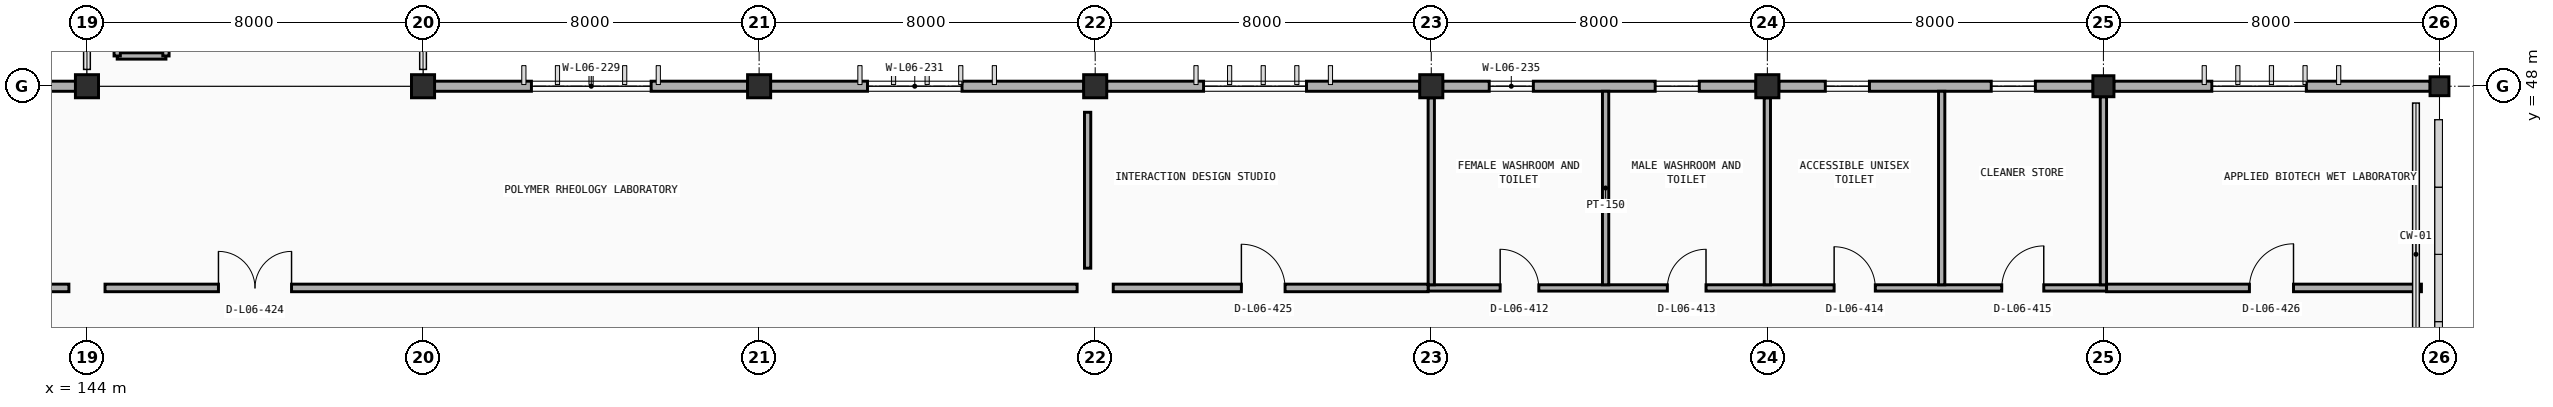
"""IFC4 building model, lengths in metres.
Left out: names, types, materials, properties, quantities, classifications, styles, units other than length and angle.
Written with IfcOpenShell. Run it as: python <this file> out.ifc"""

import sys

from ifc_helpers import new_model, si_unit, direction, frame, frame_2d, origin, origin_2d, place, context, subcontext, project, spatial, rectangle, extrude, element, fill, save


model = new_model("IFC4")
c1 = context("Model", 3, precision=1e-05, world=origin(), true_north=direction((0.0, 1.0)))
c2 = subcontext(c1, "Body", "Model", "MODEL_VIEW")
j1 = project(units=[si_unit("LENGTHUNIT", "METRE"), si_unit("PLANEANGLEUNIT", "RADIAN")], contexts=[c1])
p1 = place(None, origin())
s1 = spatial("IfcSite", under=j1, at=p1, CompositionType="ELEMENT")
p2 = place(p1, origin())
s2 = spatial("IfcBuilding", under=s1, at=p2, CompositionType="ELEMENT")
p3 = place(p2, frame((0.0, 0.0, 22.2)))
s3 = spatial("IfcBuildingStorey", under=s2, at=p3, CompositionType="ELEMENT", Elevation=22.2)
for number, where, z_axis, x_axis in (
    (1, (144.0, 48.0, 0.0), (0.0, 0.0, 1.0), (1.0, 0.0, 0.0)),
    (2, (152.0, 48.0, 0.0), (0.0, 0.0, 1.0), (1.0, 0.0, 0.0)),
    (3, (160.0, 48.0, 0.0), (0.0, 0.0, 1.0), (1.0, 0.0, 0.0)),
    (4, (168.0, 48.0, 0.0), (0.0, 0.0, 1.0), (1.0, 0.0, 0.0)),
    (5, (176.0, 48.0, 0.0), (0.0, 0.0, 1.0), (1.0, 0.0, 0.0)),
    (6, (184.0, 48.0, 0.0), (0.0, 0.0, 1.0), (1.0, 0.0, 0.0)),
):
    element("IfcColumn", number, at=place(p3, frame(where, z_axis=z_axis, x_axis=x_axis)), inside=s3, PredefinedType="COLUMN", context=c2, shape_type="SweptSolid", body=[
        extrude(rectangle(XDim=0.55, YDim=0.55, at=origin_2d()), origin(), (0.0, 0.0, 1.0), 4.2),
    ])
p4 = place(p3, frame((192.0, 48.0, 0.0), z_axis=(0.0, 0.0, 1.0), x_axis=(1.0, 0.0, 0.0)))
e7 = element("IfcColumn", 7, at=p4, inside=s3, PredefinedType="COLUMN", context=c2, shape_type="SweptSolid", body=[
    extrude(rectangle(XDim=0.5, YDim=0.5, at=origin_2d()), origin(), (0.0, 0.0, 1.0), 4.2),
])
p5 = place(p3, frame((200.0, 48.0, 0.0), z_axis=(0.0, 0.0, 1.0), x_axis=(1.0, 0.0, 0.0)))
e8 = element("IfcColumn", 8, at=p5, inside=s3, PredefinedType="COLUMN", context=c2, shape_type="SweptSolid", body=[
    extrude(rectangle(XDim=0.45, YDim=0.45, at=origin_2d()), origin(), (0.0, 0.0, 1.0), 4.2),
])
p6 = place(p3, frame((136.272, 48.0, 0.0), z_axis=(0.0, 0.0, 1.0), x_axis=(1.0, 0.0, 0.0)))
e9 = element("IfcWall", 9, at=p6, inside=s3, PredefinedType="STANDARD", context=c2, shape_type="SweptSolid", body=[
    extrude(rectangle(XDim=7.456, YDim=0.24, at=frame_2d((3.728, 0.0))), origin(), (0.0, 0.0, 1.0), 3.335),
])
p7 = place(p6, frame((2.308, 0.0, 0.9)))
e10 = element("IfcOpeningElement", 10, at=p7, cuts=e9, PredefinedType="OPENING", context=c2, shape_type="SweptSolid", body=[
    extrude(rectangle(XDim=2.45, YDim=1.85, at=frame_2d((1.225, 0.925))), frame((0.0, 0.13, 0.0), z_axis=(0.0, -1.0, 0.0), x_axis=(1.0, 0.0, 0.0)), (0.0, 0.0, 1.0), 0.26),
])
p8 = place(p3, frame((152.272, 48.0, 0.0), z_axis=(0.0, 0.0, 1.0), x_axis=(1.0, 0.0, 0.0)))
e11 = element("IfcWall", 11, at=p8, inside=s3, PredefinedType="STANDARD", context=c2, shape_type="SweptSolid", body=[
    extrude(rectangle(XDim=7.456, YDim=0.24, at=frame_2d((3.728, 0.0))), origin(), (0.0, 0.0, 1.0), 3.335),
])
p9 = place(p8, frame((2.308, 0.0, 0.9)))
e12 = element("IfcOpeningElement", 12, at=p9, cuts=e11, PredefinedType="OPENING", context=c2, shape_type="SweptSolid", body=[
    extrude(rectangle(XDim=2.85, YDim=1.85, at=frame_2d((1.425, 0.925))), frame((0.0, 0.13, 0.0), z_axis=(0.0, -1.0, 0.0), x_axis=(1.0, 0.0, 0.0)), (0.0, 0.0, 1.0), 0.26),
])
p10 = place(p3, frame((160.272, 48.0, 0.0), z_axis=(0.0, 0.0, 1.0), x_axis=(1.0, 0.0, 0.0)))
e13 = element("IfcWall", 13, at=p10, inside=s3, PredefinedType="STANDARD", context=c2, shape_type="SweptSolid", body=[
    extrude(rectangle(XDim=7.456, YDim=0.24, at=frame_2d((3.728, 0.0))), origin(), (0.0, 0.0, 1.0), 3.335),
])
p11 = place(p10, frame((2.308, 0.0, 0.9)))
e14 = element("IfcOpeningElement", 14, at=p11, cuts=e13, PredefinedType="OPENING", context=c2, shape_type="SweptSolid", body=[
    extrude(rectangle(XDim=2.25, YDim=1.85, at=frame_2d((1.125, 0.925))), frame((0.0, 0.13, 0.0), z_axis=(0.0, -1.0, 0.0), x_axis=(1.0, 0.0, 0.0)), (0.0, 0.0, 1.0), 0.26),
])
p12 = place(p3, frame((168.272, 48.0, 0.0), z_axis=(0.0, 0.0, 1.0), x_axis=(1.0, 0.0, 0.0)))
e15 = element("IfcWall", 15, at=p12, inside=s3, PredefinedType="STANDARD", context=c2, shape_type="SweptSolid", body=[
    extrude(rectangle(XDim=7.456, YDim=0.24, at=frame_2d((3.728, 0.0))), origin(), (0.0, 0.0, 1.0), 3.335),
])
p13 = place(p12, frame((2.308, 0.0, 0.9)))
e16 = element("IfcOpeningElement", 16, at=p13, cuts=e15, PredefinedType="OPENING", context=c2, shape_type="SweptSolid", body=[
    extrude(rectangle(XDim=2.45, YDim=1.85, at=frame_2d((1.225, 0.925))), frame((0.0, 0.13, 0.0), z_axis=(0.0, -1.0, 0.0), x_axis=(1.0, 0.0, 0.0)), (0.0, 0.0, 1.0), 0.26),
])
p14 = place(p3, frame((176.272, 48.0, 0.0), z_axis=(0.0, 0.0, 1.0), x_axis=(1.0, 0.0, 0.0)))
e17 = element("IfcWall", 17, at=p14, inside=s3, PredefinedType="STANDARD", context=c2, shape_type="SweptSolid", body=[
    extrude(rectangle(XDim=7.456, YDim=0.24, at=frame_2d((3.728, 0.0))), origin(), (0.0, 0.0, 1.0), 3.335),
])
p15 = place(p14, frame((1.108, 0.0, 1.15)))
e18 = element("IfcOpeningElement", 18, at=p15, cuts=e17, PredefinedType="OPENING", context=c2, shape_type="SweptSolid", body=[
    extrude(rectangle(XDim=1.05, YDim=1.25, at=frame_2d((0.525, 0.625))), frame((0.0, 0.13, 0.0), z_axis=(0.0, -1.0, 0.0), x_axis=(1.0, 0.0, 0.0)), (0.0, 0.0, 1.0), 0.26),
])
p16 = place(p14, frame((5.058, 0.0, 1.15)))
e19 = element("IfcOpeningElement", 19, at=p16, cuts=e17, PredefinedType="OPENING", context=c2, shape_type="SweptSolid", body=[
    extrude(rectangle(XDim=1.05, YDim=1.25, at=frame_2d((0.525, 0.625))), frame((0.0, 0.13, 0.0), z_axis=(0.0, -1.0, 0.0), x_axis=(1.0, 0.0, 0.0)), (0.0, 0.0, 1.0), 0.26),
])
p17 = place(p3, frame((184.272, 48.0, 0.0), z_axis=(0.0, 0.0, 1.0), x_axis=(1.0, 0.0, 0.0)))
e20 = element("IfcWall", 20, at=p17, inside=s3, PredefinedType="STANDARD", context=c2, shape_type="SweptSolid", body=[
    extrude(rectangle(XDim=7.481, YDim=0.24, at=frame_2d((3.74, 0.0))), origin(), (0.0, 0.0, 1.0), 3.35),
])
p18 = place(p17, frame((1.108, 0.0, 1.15)))
e21 = element("IfcOpeningElement", 21, at=p18, cuts=e20, PredefinedType="OPENING", context=c2, shape_type="SweptSolid", body=[
    extrude(rectangle(XDim=1.05, YDim=1.25, at=frame_2d((0.525, 0.625))), frame((0.0, 0.13, 0.0), z_axis=(0.0, -1.0, 0.0), x_axis=(1.0, 0.0, 0.0)), (0.0, 0.0, 1.0), 0.26),
])
p19 = place(p17, frame((5.058, 0.0, 1.15)))
e22 = element("IfcOpeningElement", 22, at=p19, cuts=e20, PredefinedType="OPENING", context=c2, shape_type="SweptSolid", body=[
    extrude(rectangle(XDim=1.05, YDim=1.25, at=frame_2d((0.525, 0.625))), frame((0.0, 0.13, 0.0), z_axis=(0.0, -1.0, 0.0), x_axis=(1.0, 0.0, 0.0)), (0.0, 0.0, 1.0), 0.26),
])
p20 = place(p3, frame((192.247, 48.0, 0.0), z_axis=(0.0, 0.0, 1.0), x_axis=(1.0, 0.0, 0.0)))
e23 = element("IfcWall", 23, at=p20, inside=s3, PredefinedType="STANDARD", context=c2, shape_type="SweptSolid", body=[
    extrude(rectangle(XDim=7.531, YDim=0.24, at=frame_2d((3.766, 0.0))), origin(), (0.0, 0.0, 1.0), 3.35),
])
p21 = place(p20, frame((2.333, 0.0, 0.9)))
e24 = element("IfcOpeningElement", 24, at=p21, cuts=e23, PredefinedType="OPENING", context=c2, shape_type="SweptSolid", body=[
    extrude(rectangle(XDim=2.25, YDim=1.85, at=frame_2d((1.125, 0.925))), frame((0.0, 0.13, 0.0), z_axis=(0.0, -1.0, 0.0), x_axis=(1.0, 0.0, 0.0)), (0.0, 0.0, 1.0), 0.26),
])
p22 = place(p3, frame((199.76, 47.78, 0.0), z_axis=(0.0, 0.0, 1.0), x_axis=(-1.0, 0.0, 0.0)))
e25 = element("IfcWall", 25, at=p22, inside=s3, PredefinedType="PARAPET", context=c2, shape_type="SweptSolid", body=[
    extrude(rectangle(XDim=0.32, YDim=0.2, at=frame_2d((0.16, 0.0))), origin(), (0.0, 0.0, 1.0), 3.35),
])
for number, where, z_axis, x_axis in (
    (26, (144.72, 48.72, 0.0), (0.0, 0.0, 1.0), (1.0, 0.0, 0.0)),
    (27, (145.88, 48.72, 0.0), (0.0, 0.0, 1.0), (0.0, 1.0, 0.0)),
    (28, (144.72, 49.88, 0.0), (0.0, 0.0, 1.0), (0.0, -1.0, 0.0)),
):
    element("IfcWall", number, at=place(p3, frame(where, z_axis=z_axis, x_axis=x_axis)), inside=s3, PredefinedType="PARTITIONING", context=c2, shape_type="SweptSolid", body=[
        extrude(rectangle(XDim=1.16, YDim=0.15, at=frame_2d((0.58, 0.0))), origin(), (0.0, 0.0, 1.0), 3.9),
    ])
p23 = place(p3, frame((175.925, 43.2, 0.0), z_axis=(0.0, 0.0, 1.0), x_axis=(1.0, 0.0, 0.0)))
e29 = element("IfcWall", 29, at=p23, inside=s3, PredefinedType="PARTITIONING", context=c2, shape_type="SweptSolid", body=[
    extrude(rectangle(XDim=16.15, YDim=0.15, at=frame_2d((8.075, 0.0))), origin(), (0.0, 0.0, 1.0), 3.3),
])
p24 = place(p23, frame((1.715, 0.0, 0.0)))
e30 = element("IfcOpeningElement", 30, at=p24, cuts=e29, PredefinedType="OPENING", context=c2, shape_type="SweptSolid", body=[
    extrude(rectangle(XDim=0.92, YDim=2.12, at=frame_2d((0.46, 1.06))), frame((0.0, 0.085, 0.0), z_axis=(0.0, -1.0, 0.0), x_axis=(1.0, 0.0, 0.0)), (0.0, 0.0, 1.0), 0.17),
])
p25 = place(p23, frame((5.695, 0.0, 0.0)))
e31 = element("IfcOpeningElement", 31, at=p25, cuts=e29, PredefinedType="OPENING", context=c2, shape_type="SweptSolid", body=[
    extrude(rectangle(XDim=0.92, YDim=2.12, at=frame_2d((0.46, 1.06))), frame((0.0, 0.085, 0.0), z_axis=(0.0, -1.0, 0.0), x_axis=(1.0, 0.0, 0.0)), (0.0, 0.0, 1.0), 0.17),
])
p26 = place(p23, frame((9.665, 0.0, 0.0)))
e32 = element("IfcOpeningElement", 32, at=p26, cuts=e29, PredefinedType="OPENING", context=c2, shape_type="SweptSolid", body=[
    extrude(rectangle(XDim=0.98, YDim=2.12, at=frame_2d((0.49, 1.06))), frame((0.0, 0.085, 0.0), z_axis=(0.0, -1.0, 0.0), x_axis=(1.0, 0.0, 0.0)), (0.0, 0.0, 1.0), 0.17),
])
p27 = place(p23, frame((13.655, 0.0, 0.0)))
e33 = element("IfcOpeningElement", 33, at=p27, cuts=e29, PredefinedType="OPENING", context=c2, shape_type="SweptSolid", body=[
    extrude(rectangle(XDim=1.0, YDim=2.15, at=frame_2d((0.5, 1.075))), frame((0.0, 0.085, 0.0), z_axis=(0.0, -1.0, 0.0), x_axis=(1.0, 0.0, 0.0)), (0.0, 0.0, 1.0), 0.17),
])
p28 = place(p3, frame((176.0, 43.275, 0.0), z_axis=(0.0, 0.0, 1.0), x_axis=(0.0, 1.0, 0.0)))
e34 = element("IfcWall", 34, at=p28, inside=s3, PredefinedType="PARTITIONING", context=c2, shape_type="SweptSolid", body=[
    extrude(rectangle(XDim=4.45, YDim=0.15, at=frame_2d((2.225, 0.0))), origin(), (0.0, 0.0, 1.0), 3.3),
])
p29 = place(p3, frame((180.15, 43.275, 0.0), z_axis=(0.0, 0.0, 1.0), x_axis=(0.0, 1.0, 0.0)))
e35 = element("IfcWall", 35, at=p29, inside=s3, PredefinedType="PARTITIONING", context=c2, shape_type="SweptSolid", body=[
    extrude(rectangle(XDim=4.605, YDim=0.15, at=frame_2d((2.302, 0.0))), origin(), (0.0, 0.0, 1.0), 3.3),
])
p30 = place(p3, frame((184.0, 43.275, 0.0), z_axis=(0.0, 0.0, 1.0), x_axis=(0.0, 1.0, 0.0)))
e36 = element("IfcWall", 36, at=p30, inside=s3, PredefinedType="PARTITIONING", context=c2, shape_type="SweptSolid", body=[
    extrude(rectangle(XDim=4.45, YDim=0.15, at=frame_2d((2.225, 0.0))), origin(), (0.0, 0.0, 1.0), 3.3),
])
p31 = place(p3, frame((188.15, 43.275, 0.0), z_axis=(0.0, 0.0, 1.0), x_axis=(0.0, 1.0, 0.0)))
e37 = element("IfcWall", 37, at=p31, inside=s3, PredefinedType="PARTITIONING", context=c2, shape_type="SweptSolid", body=[
    extrude(rectangle(XDim=4.605, YDim=0.15, at=frame_2d((2.302, 0.0))), origin(), (0.0, 0.0, 1.0), 3.3),
])
p32 = place(p3, frame((192.0, 43.275, 0.0), z_axis=(0.0, 0.0, 1.0), x_axis=(0.0, 1.0, 0.0)))
e38 = element("IfcWall", 38, at=p32, inside=s3, PredefinedType="PARTITIONING", context=c2, shape_type="SweptSolid", body=[
    extrude(rectangle(XDim=4.475, YDim=0.15, at=frame_2d((2.238, 0.0))), origin(), (0.0, 0.0, 1.0), 3.3),
])
p33 = place(p3, frame((128.43, 43.2, 0.0), z_axis=(0.0, 0.0, 1.0), x_axis=(1.0, 0.0, 0.0)))
e39 = element("IfcWall", 39, at=p33, inside=s3, PredefinedType="PARTITIONING", context=c2, shape_type="SweptSolid", body=[
    extrude(rectangle(XDim=15.14, YDim=0.18, at=frame_2d((7.57, 0.0))), origin(), (0.0, 0.0, 1.0), 3.3),
])
p34 = place(p33, frame((3.11, 0.0, 0.0)))
e40 = element("IfcOpeningElement", 40, at=p34, cuts=e39, PredefinedType="OPENING", context=c2, shape_type="SweptSolid", body=[
    extrude(rectangle(XDim=0.92, YDim=2.15, at=frame_2d((0.46, 1.075))), frame((0.0, 0.1, 0.0), z_axis=(0.0, -1.0, 0.0), x_axis=(1.0, 0.0, 0.0)), (0.0, 0.0, 1.0), 0.2),
])
p35 = place(p3, frame((144.43, 43.2, 0.0), z_axis=(0.0, 0.0, 1.0), x_axis=(1.0, 0.0, 0.0)))
e41 = element("IfcWall", 41, at=p35, inside=s3, PredefinedType="PARTITIONING", context=c2, shape_type="SweptSolid", body=[
    extrude(rectangle(XDim=23.14, YDim=0.18, at=frame_2d((11.57, 0.0))), origin(), (0.0, 0.0, 1.0), 3.3),
])
p36 = place(p35, frame((2.7, 0.0, 0.0)))
e42 = element("IfcOpeningElement", 42, at=p36, cuts=e41, PredefinedType="OPENING", context=c2, shape_type="SweptSolid", body=[
    extrude(rectangle(XDim=1.74, YDim=2.22, at=frame_2d((0.87, 1.11))), frame((0.0, 0.1, 0.0), z_axis=(0.0, -1.0, 0.0), x_axis=(1.0, 0.0, 0.0)), (0.0, 0.0, 1.0), 0.2),
])
p37 = place(p3, frame((167.82, 43.67, 0.0), z_axis=(0.0, 0.0, 1.0), x_axis=(0.0, 1.0, 0.0)))
e43 = element("IfcWall", 43, at=p37, inside=s3, PredefinedType="PARTITIONING", context=c2, shape_type="SweptSolid", body=[
    extrude(rectangle(XDim=3.71, YDim=0.15, at=frame_2d((1.855, 0.0))), origin(), (0.0, 0.0, 1.0), 3.3),
])
p38 = place(p3, frame((168.43, 43.2, 0.0), z_axis=(0.0, 0.0, 1.0), x_axis=(1.0, 0.0, 0.0)))
e44 = element("IfcWall", 44, at=p38, inside=s3, PredefinedType="PARTITIONING", context=c2, shape_type="SweptSolid", body=[
    extrude(rectangle(XDim=7.495, YDim=0.18, at=frame_2d((3.748, 0.0))), origin(), (0.0, 0.0, 1.0), 3.3),
])
p39 = place(p38, frame((3.05, 0.0, 0.0)))
e45 = element("IfcOpeningElement", 45, at=p39, cuts=e44, PredefinedType="OPENING", context=c2, shape_type="SweptSolid", body=[
    extrude(rectangle(XDim=1.04, YDim=2.15, at=frame_2d((0.52, 1.075))), frame((0.0, 0.1, 0.0), z_axis=(0.0, -1.0, 0.0), x_axis=(1.0, 0.0, 0.0)), (0.0, 0.0, 1.0), 0.2),
])
p40 = place(p3, frame((192.075, 43.2, 0.0), z_axis=(0.0, 0.0, 1.0), x_axis=(1.0, 0.0, 0.0)))
e46 = element("IfcWall", 46, at=p40, inside=s3, PredefinedType="PARTITIONING", context=c2, shape_type="SweptSolid", body=[
    extrude(rectangle(XDim=7.495, YDim=0.18, at=frame_2d((3.748, 0.0))), origin(), (0.0, 0.0, 1.0), 3.3),
])
p41 = place(p40, frame((3.4, 0.0, 0.0)))
e47 = element("IfcOpeningElement", 47, at=p41, cuts=e46, PredefinedType="OPENING", context=c2, shape_type="SweptSolid", body=[
    extrude(rectangle(XDim=1.05, YDim=2.15, at=frame_2d((0.525, 1.075))), frame((0.0, 0.1, 0.0), z_axis=(0.0, -1.0, 0.0), x_axis=(1.0, 0.0, 0.0)), (0.0, 0.0, 1.0), 0.2),
])
p42 = place(p9, origin())
e48 = element("IfcWindow", 48, at=p42, inside=s3, PartitioningType="DOUBLE_PANEL_VERTICAL", PredefinedType="WINDOW", context=c2, shape_type="SweptSolid", body=[
    extrude(rectangle(XDim=2.85, YDim=1.85, at=frame_2d((1.425, 0.925))), frame((0.0, 0.03, 0.0), z_axis=(0.0, -1.0, 0.0), x_axis=(1.0, 0.0, 0.0)), (0.0, 0.0, 1.0), 0.06),
])
fill(e12, e48)
p43 = place(p11, origin())
e49 = element("IfcWindow", 49, at=p43, inside=s3, PartitioningType="DOUBLE_PANEL_VERTICAL", PredefinedType="WINDOW", context=c2, shape_type="SweptSolid", body=[
    extrude(rectangle(XDim=2.25, YDim=1.85, at=frame_2d((1.125, 0.925))), frame((0.0, 0.03, 0.0), z_axis=(0.0, -1.0, 0.0), x_axis=(1.0, 0.0, 0.0)), (0.0, 0.0, 1.0), 0.06),
])
fill(e14, e49)
p44 = place(p13, origin())
e50 = element("IfcWindow", 50, at=p44, inside=s3, PartitioningType="DOUBLE_PANEL_VERTICAL", PredefinedType="WINDOW", context=c2, shape_type="SweptSolid", body=[
    extrude(rectangle(XDim=2.45, YDim=1.85, at=frame_2d((1.225, 0.925))), frame((0.0, 0.03, 0.0), z_axis=(0.0, -1.0, 0.0), x_axis=(1.0, 0.0, 0.0)), (0.0, 0.0, 1.0), 0.06),
])
fill(e16, e50)
p45 = place(p15, origin())
e51 = element("IfcWindow", 51, at=p45, inside=s3, PartitioningType="SINGLE_PANEL", PredefinedType="WINDOW", context=c2, shape_type="SweptSolid", body=[
    extrude(rectangle(XDim=1.05, YDim=1.25, at=frame_2d((0.525, 0.625))), frame((0.0, 0.03, 0.0), z_axis=(0.0, -1.0, 0.0), x_axis=(1.0, 0.0, 0.0)), (0.0, 0.0, 1.0), 0.06),
])
fill(e18, e51)
p46 = place(p16, origin())
e52 = element("IfcWindow", 52, at=p46, inside=s3, PartitioningType="SINGLE_PANEL", PredefinedType="WINDOW", context=c2, shape_type="SweptSolid", body=[
    extrude(rectangle(XDim=1.05, YDim=1.25, at=frame_2d((0.525, 0.625))), frame((0.0, 0.03, 0.0), z_axis=(0.0, -1.0, 0.0), x_axis=(1.0, 0.0, 0.0)), (0.0, 0.0, 1.0), 0.06),
])
fill(e19, e52)
p47 = place(p18, origin())
e53 = element("IfcWindow", 53, at=p47, inside=s3, PartitioningType="SINGLE_PANEL", PredefinedType="WINDOW", context=c2, shape_type="SweptSolid", body=[
    extrude(rectangle(XDim=1.05, YDim=1.25, at=frame_2d((0.525, 0.625))), frame((0.0, 0.03, 0.0), z_axis=(0.0, -1.0, 0.0), x_axis=(1.0, 0.0, 0.0)), (0.0, 0.0, 1.0), 0.06),
])
fill(e21, e53)
p48 = place(p19, origin())
e54 = element("IfcWindow", 54, at=p48, inside=s3, PartitioningType="SINGLE_PANEL", PredefinedType="WINDOW", context=c2, shape_type="SweptSolid", body=[
    extrude(rectangle(XDim=1.05, YDim=1.25, at=frame_2d((0.525, 0.625))), frame((0.0, 0.03, 0.0), z_axis=(0.0, -1.0, 0.0), x_axis=(1.0, 0.0, 0.0)), (0.0, 0.0, 1.0), 0.06),
])
fill(e22, e54)
p49 = place(p21, origin())
e55 = element("IfcWindow", 55, at=p49, inside=s3, PartitioningType="DOUBLE_PANEL_VERTICAL", PredefinedType="WINDOW", context=c2, shape_type="SweptSolid", body=[
    extrude(rectangle(XDim=2.25, YDim=1.85, at=frame_2d((1.125, 0.925))), frame((0.0, 0.03, 0.0), z_axis=(0.0, -1.0, 0.0), x_axis=(1.0, 0.0, 0.0)), (0.0, 0.0, 1.0), 0.06),
])
fill(e24, e55)
p50 = place(p24, origin())
e56 = element("IfcDoor", 56, at=p50, inside=s3, OperationType="SINGLE_SWING_LEFT", PredefinedType="DOOR", context=c2, shape_type="SweptSolid", body=[
    extrude(rectangle(XDim=0.92, YDim=2.12, at=frame_2d((0.46, 1.06))), frame((0.0, 0.025, 0.0), z_axis=(0.0, -1.0, 0.0), x_axis=(1.0, 0.0, 0.0)), (0.0, 0.0, 1.0), 0.05),
])
fill(e30, e56)
p51 = place(p25, origin())
e57 = element("IfcDoor", 57, at=p51, inside=s3, OperationType="SINGLE_SWING_RIGHT", PredefinedType="DOOR", context=c2, shape_type="SweptSolid", body=[
    extrude(rectangle(XDim=0.92, YDim=2.12, at=frame_2d((0.46, 1.06))), frame((0.0, 0.025, 0.0), z_axis=(0.0, -1.0, 0.0), x_axis=(1.0, 0.0, 0.0)), (0.0, 0.0, 1.0), 0.05),
])
fill(e31, e57)
p52 = place(p26, origin())
e58 = element("IfcDoor", 58, at=p52, inside=s3, OperationType="SINGLE_SWING_LEFT", PredefinedType="DOOR", context=c2, shape_type="SweptSolid", body=[
    extrude(rectangle(XDim=0.98, YDim=2.12, at=frame_2d((0.49, 1.06))), frame((0.0, 0.025, 0.0), z_axis=(0.0, -1.0, 0.0), x_axis=(1.0, 0.0, 0.0)), (0.0, 0.0, 1.0), 0.05),
])
fill(e32, e58)
p53 = place(p27, origin())
e59 = element("IfcDoor", 59, at=p53, inside=s3, OperationType="SINGLE_SWING_RIGHT", PredefinedType="DOOR", context=c2, shape_type="SweptSolid", body=[
    extrude(rectangle(XDim=1.0, YDim=2.15, at=frame_2d((0.5, 1.075))), frame((0.0, 0.025, 0.0), z_axis=(0.0, -1.0, 0.0), x_axis=(1.0, 0.0, 0.0)), (0.0, 0.0, 1.0), 0.05),
])
fill(e33, e59)
p54 = place(p36, origin())
e60 = element("IfcDoor", 60, at=p54, inside=s3, OperationType="DOUBLE_DOOR_SINGLE_SWING", PredefinedType="DOOR", context=c2, shape_type="SweptSolid", body=[
    extrude(rectangle(XDim=1.74, YDim=2.22, at=frame_2d((0.87, 1.11))), frame((0.0, 0.025, 0.0), z_axis=(0.0, -1.0, 0.0), x_axis=(1.0, 0.0, 0.0)), (0.0, 0.0, 1.0), 0.05),
])
fill(e42, e60)
p55 = place(p39, origin())
e61 = element("IfcDoor", 61, at=p55, inside=s3, OperationType="SINGLE_SWING_LEFT", PredefinedType="DOOR", context=c2, shape_type="SweptSolid", body=[
    extrude(rectangle(XDim=1.04, YDim=2.15, at=frame_2d((0.52, 1.075))), frame((0.0, 0.025, 0.0), z_axis=(0.0, -1.0, 0.0), x_axis=(1.0, 0.0, 0.0)), (0.0, 0.0, 1.0), 0.05),
])
fill(e45, e61)
p56 = place(p41, origin())
e62 = element("IfcDoor", 62, at=p56, inside=s3, OperationType="SINGLE_SWING_RIGHT", PredefinedType="DOOR", context=c2, shape_type="SweptSolid", body=[
    extrude(rectangle(XDim=1.05, YDim=2.15, at=frame_2d((0.525, 1.075))), frame((0.0, 0.025, 0.0), z_axis=(0.0, -1.0, 0.0), x_axis=(1.0, 0.0, 0.0)), (0.0, 0.0, 1.0), 0.05),
])
fill(e47, e62)
save(model, sys.argv[1])
